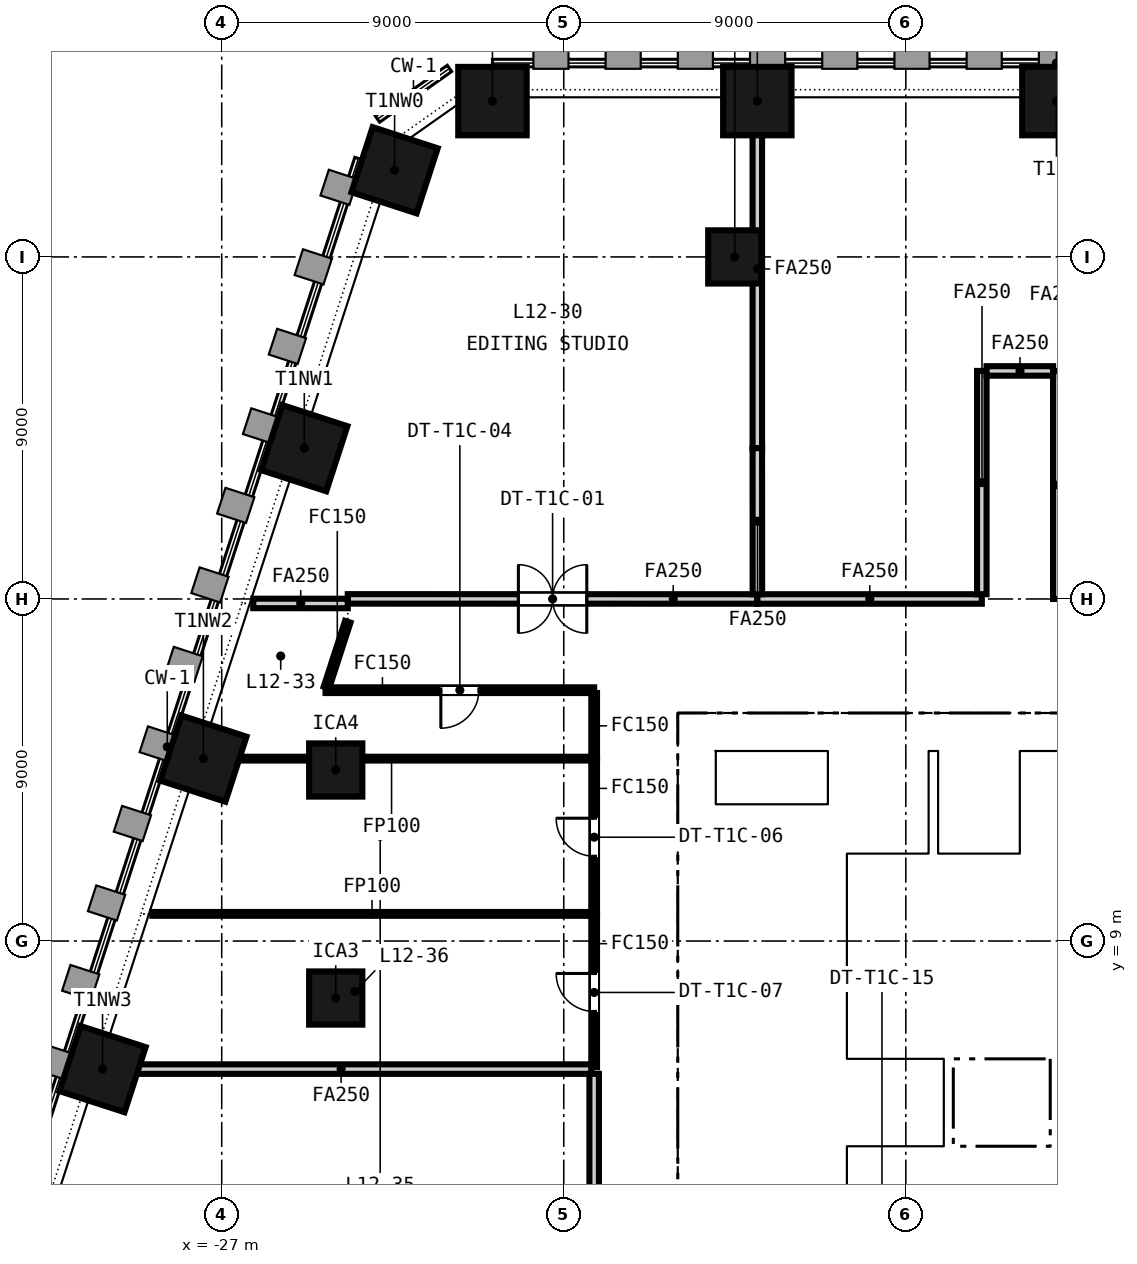
"""IFC4 building model, lengths in metres.
Left out: names, types, materials, properties, quantities, classifications, styles, units other than length and angle.
Written with IfcOpenShell. Run it as: python <this file> out.ifc"""

import sys

from ifc_helpers import new_model, si_unit, direction, frame, frame_2d, origin, origin_2d, place, context, subcontext, project, spatial, rectangle, extrude, element, fill, save


model = new_model("IFC4")
c1 = context("Model", 3, precision=1e-05, world=origin(), true_north=direction((0.0, 1.0)))
c2 = subcontext(c1, "Body", "Model", "MODEL_VIEW")
j1 = project(units=[si_unit("LENGTHUNIT", "METRE"), si_unit("PLANEANGLEUNIT", "RADIAN")], contexts=[c1])
p1 = place(None, origin())
s1 = spatial("IfcSite", under=j1, at=p1, CompositionType="ELEMENT")
p2 = place(p1, origin())
s2 = spatial("IfcBuilding", under=s1, at=p2, CompositionType="ELEMENT")
p3 = place(p2, frame((0.0, 0.0, 57.9)))
s3 = spatial("IfcBuildingStorey", under=s2, at=p3, CompositionType="ELEMENT", Elevation=57.9)
p4 = place(p3, frame((-15.0, 14.5, -0.15), z_axis=(0.0, 0.0, 1.0), x_axis=(1.0, 0.0, 0.0)))
e1 = element("IfcWall", 1, at=p4, inside=s3, PredefinedType="SOLIDWALL", context=c2, shape_type="SweptSolid", body=[
    extrude(rectangle(XDim=30.0, YDim=1.0, at=frame_2d((15.0, 0.0))), origin(), (0.0, 0.0, 1.0), 3.65),
])
p5 = place(p4, frame((9.25, 0.0, 0.15)))
e2 = element("IfcOpeningElement", 2, at=p5, cuts=e1, PredefinedType="OPENING", context=c2, shape_type="SweptSolid", body=[
    extrude(rectangle(XDim=1.5, YDim=2.1, at=frame_2d((0.75, 1.05))), frame((0.0, 0.51, 0.0), z_axis=(0.0, -1.0, 0.0), x_axis=(1.0, 0.0, 0.0)), (0.0, 0.0, 1.0), 1.02),
])
p6 = place(p4, frame((19.4, 0.0, 0.15)))
e3 = element("IfcOpeningElement", 3, at=p6, cuts=e1, PredefinedType="OPENING", context=c2, shape_type="SweptSolid", body=[
    extrude(rectangle(XDim=1.5, YDim=2.1, at=frame_2d((0.75, 1.05))), frame((0.0, 0.51, 0.0), z_axis=(0.0, -1.0, 0.0), x_axis=(1.0, 0.0, 0.0)), (0.0, 0.0, 1.0), 1.02),
])
p7 = place(p4, frame((1.5, 0.0, 0.15)))
e4 = element("IfcOpeningElement", 4, at=p7, cuts=e1, PredefinedType="OPENING", context=c2, shape_type="SweptSolid", body=[
    extrude(rectangle(XDim=1.2, YDim=2.1, at=frame_2d((0.6, 1.05))), frame((0.0, 0.51, 0.0), z_axis=(0.0, -1.0, 0.0), x_axis=(1.0, 0.0, 0.0)), (0.0, 0.0, 1.0), 1.02),
])
p8 = place(p4, frame((27.3, 0.0, 0.15)))
e5 = element("IfcOpeningElement", 5, at=p8, cuts=e1, PredefinedType="OPENING", context=c2, shape_type="SweptSolid", body=[
    extrude(rectangle(XDim=1.2, YDim=2.1, at=frame_2d((0.6, 1.05))), frame((0.0, 0.51, 0.0), z_axis=(0.0, -1.0, 0.0), x_axis=(1.0, 0.0, 0.0)), (0.0, 0.0, 1.0), 1.02),
])
p9 = place(p3, frame((-14.5, 1.0, -0.15), z_axis=(0.0, 0.0, 1.0), x_axis=(0.0, 1.0, 0.0)))
e6 = element("IfcWall", 6, at=p9, inside=s3, PredefinedType="SOLIDWALL", context=c2, shape_type="SweptSolid", body=[
    extrude(rectangle(XDim=13.0, YDim=1.0, at=frame_2d((6.5, 0.0))), origin(), (0.0, 0.0, 1.0), 3.65),
])
p10 = place(p3, frame((-10.8, 1.0, -0.15), z_axis=(0.0, 0.0, 1.0), x_axis=(0.0, 1.0, 0.0)))
e7 = element("IfcWall", 7, at=p10, inside=s3, PredefinedType="SOLIDWALL", context=c2, shape_type="SweptSolid", body=[
    extrude(rectangle(XDim=13.0, YDim=0.5, at=frame_2d((6.5, 0.0))), origin(), (0.0, 0.0, 1.0), 3.65),
])
for number, where, z_axis, x_axis in (
    (8, (-5.037, 31.1, -0.15), (0.0, 0.0, 1.0), (-1.0, 0.0, 0.0)),
    (9, (-12.907, 31.1, -0.15), (0.0, 0.0, 1.0), (-1.0, 0.0, 0.0)),
    (10, (-19.876, 31.1, -0.15), (0.0, 0.0, 1.0), (-1.0, 0.0, 0.0)),
    (11, (-22.451, 29.281, -0.15), (0.0, 0.0, 1.0), (-0.309, -0.951, 0.0)),
    (12, (-24.827, 21.968, -0.15), (0.0, 0.0, 1.0), (-0.309, -0.951, 0.0)),
    (13, (-27.482, 13.799, -0.15), (0.0, 0.0, 1.0), (-0.309, -0.951, 0.0)),
    (14, (-30.136, 5.63, -0.15), (0.0, 0.0, 1.0), (-0.309, -0.951, 0.0)),
):
    element("IfcColumn", number, at=place(p3, frame(where, z_axis=z_axis, x_axis=x_axis)), inside=s3, PredefinedType="COLUMN", context=c2, shape_type="SweptSolid", body=[
        extrude(rectangle(XDim=1.8, YDim=1.8, at=origin_2d()), origin(), (0.0, 0.0, 1.0), 3.65),
    ])
for number, where, z_axis, x_axis in (
    (15, (-24.0, 7.5, -0.15), (0.0, 0.0, 1.0), (1.0, 0.0, 0.0)),
    (16, (-24.0, 13.5, -0.15), (0.0, 0.0, 1.0), (1.0, 0.0, 0.0)),
    (17, (-13.5, 27.0, -0.15), (0.0, 0.0, 1.0), (1.0, 0.0, 0.0)),
):
    element("IfcColumn", number, at=place(p3, frame(where, z_axis=z_axis, x_axis=x_axis)), inside=s3, PredefinedType="COLUMN", context=c2, shape_type="SweptSolid", body=[
        extrude(rectangle(XDim=1.4, YDim=1.4, at=origin_2d()), origin(), (0.0, 0.0, 1.0), 3.65),
    ])
p11 = place(p3, frame((-10.55, 3.5, 0.0), z_axis=(0.0, 0.0, 1.0), x_axis=(1.0, 0.0, 0.0)))
e18 = element("IfcWall", 18, at=p11, inside=s3, PredefinedType="PARTITIONING", context=c2, shape_type="SweptSolid", body=[
    extrude(rectangle(XDim=21.1, YDim=0.2, at=frame_2d((10.55, 0.0))), origin(), (0.0, 0.0, 1.0), 3.5),
])
p12 = place(p11, frame((0.675, 0.0, 0.0)))
e19 = element("IfcOpeningElement", 19, at=p12, cuts=e18, PredefinedType="OPENING", context=c2, shape_type="SweptSolid", body=[
    extrude(rectangle(XDim=1.2, YDim=2.1, at=frame_2d((0.6, 1.05))), frame((0.0, 0.11, 0.0), z_axis=(0.0, -1.0, 0.0), x_axis=(1.0, 0.0, 0.0)), (0.0, 0.0, 1.0), 0.22),
])
p13 = place(p11, frame((3.475, 0.0, 0.0)))
e20 = element("IfcOpeningElement", 20, at=p13, cuts=e18, PredefinedType="OPENING", context=c2, shape_type="SweptSolid", body=[
    extrude(rectangle(XDim=1.2, YDim=2.1, at=frame_2d((0.6, 1.05))), frame((0.0, 0.11, 0.0), z_axis=(0.0, -1.0, 0.0), x_axis=(1.0, 0.0, 0.0)), (0.0, 0.0, 1.0), 0.22),
])
p14 = place(p11, frame((6.275, 0.0, 0.0)))
e21 = element("IfcOpeningElement", 21, at=p14, cuts=e18, PredefinedType="OPENING", context=c2, shape_type="SweptSolid", body=[
    extrude(rectangle(XDim=1.2, YDim=2.1, at=frame_2d((0.6, 1.05))), frame((0.0, 0.11, 0.0), z_axis=(0.0, -1.0, 0.0), x_axis=(1.0, 0.0, 0.0)), (0.0, 0.0, 1.0), 0.22),
])
p15 = place(p11, frame((9.075, 0.0, 0.0)))
e22 = element("IfcOpeningElement", 22, at=p15, cuts=e18, PredefinedType="OPENING", context=c2, shape_type="SweptSolid", body=[
    extrude(rectangle(XDim=1.2, YDim=2.1, at=frame_2d((0.6, 1.05))), frame((0.0, 0.11, 0.0), z_axis=(0.0, -1.0, 0.0), x_axis=(1.0, 0.0, 0.0)), (0.0, 0.0, 1.0), 0.22),
])
p16 = place(p11, frame((11.875, 0.0, 0.0)))
e23 = element("IfcOpeningElement", 23, at=p16, cuts=e18, PredefinedType="OPENING", context=c2, shape_type="SweptSolid", body=[
    extrude(rectangle(XDim=1.2, YDim=2.1, at=frame_2d((0.6, 1.05))), frame((0.0, 0.11, 0.0), z_axis=(0.0, -1.0, 0.0), x_axis=(1.0, 0.0, 0.0)), (0.0, 0.0, 1.0), 0.22),
])
p17 = place(p11, frame((14.675, 0.0, 0.0)))
e24 = element("IfcOpeningElement", 24, at=p17, cuts=e18, PredefinedType="OPENING", context=c2, shape_type="SweptSolid", body=[
    extrude(rectangle(XDim=1.2, YDim=2.1, at=frame_2d((0.6, 1.05))), frame((0.0, 0.11, 0.0), z_axis=(0.0, -1.0, 0.0), x_axis=(1.0, 0.0, 0.0)), (0.0, 0.0, 1.0), 0.22),
])
p18 = place(p11, frame((17.475, 0.0, 0.0)))
e25 = element("IfcOpeningElement", 25, at=p18, cuts=e18, PredefinedType="OPENING", context=c2, shape_type="SweptSolid", body=[
    extrude(rectangle(XDim=1.2, YDim=2.1, at=frame_2d((0.6, 1.05))), frame((0.0, 0.11, 0.0), z_axis=(0.0, -1.0, 0.0), x_axis=(1.0, 0.0, 0.0)), (0.0, 0.0, 1.0), 0.22),
])
p19 = place(p11, frame((19.9, 0.0, 0.0)))
e26 = element("IfcOpeningElement", 26, at=p19, cuts=e18, PredefinedType="OPENING", context=c2, shape_type="SweptSolid", body=[
    extrude(rectangle(XDim=0.9, YDim=2.1, at=frame_2d((0.45, 1.05))), frame((0.0, 0.11, 0.0), z_axis=(0.0, -1.0, 0.0), x_axis=(1.0, 0.0, 0.0)), (0.0, 0.0, 1.0), 0.22),
])
p20 = place(p3, frame((-10.55, 6.025, 0.0), z_axis=(0.0, 0.0, 1.0), x_axis=(1.0, 0.0, 0.0)))
e27 = element("IfcWall", 27, at=p20, inside=s3, PredefinedType="PARTITIONING", context=c2, shape_type="SweptSolid", body=[
    extrude(rectangle(XDim=21.1, YDim=0.25, at=frame_2d((10.55, 0.0))), origin(), (0.0, 0.0, 1.0), 3.5),
])
p21 = place(p3, frame((-10.55, 11.2, 0.0), z_axis=(0.0, 0.0, 1.0), x_axis=(1.0, 0.0, 0.0)))
e28 = element("IfcWall", 28, at=p21, inside=s3, PredefinedType="PARTITIONING", context=c2, shape_type="SweptSolid", body=[
    extrude(rectangle(XDim=4.8, YDim=0.2, at=frame_2d((2.4, 0.0))), origin(), (0.0, 0.0, 1.0), 3.5),
])
p22 = place(p21, frame((0.525, 0.0, 0.0)))
e29 = element("IfcOpeningElement", 29, at=p22, cuts=e28, PredefinedType="OPENING", context=c2, shape_type="SweptSolid", body=[
    extrude(rectangle(XDim=1.1, YDim=2.1, at=frame_2d((0.55, 1.05))), frame((0.0, 0.11, 0.0), z_axis=(0.0, -1.0, 0.0), x_axis=(1.0, 0.0, 0.0)), (0.0, 0.0, 1.0), 0.22),
])
p23 = place(p21, frame((2.925, 0.0, 0.0)))
e30 = element("IfcOpeningElement", 30, at=p23, cuts=e28, PredefinedType="OPENING", context=c2, shape_type="SweptSolid", body=[
    extrude(rectangle(XDim=1.1, YDim=2.1, at=frame_2d((0.55, 1.05))), frame((0.0, 0.11, 0.0), z_axis=(0.0, -1.0, 0.0), x_axis=(1.0, 0.0, 0.0)), (0.0, 0.0, 1.0), 0.22),
])
for number, where, z_axis, x_axis in (
    (31, (-7.875, 3.6, 0.0), (0.0, 0.0, 1.0), (0.0, 1.0, 0.0)),
    (32, (-5.075, 3.6, 0.0), (0.0, 0.0, 1.0), (0.0, 1.0, 0.0)),
):
    element("IfcWall", number, at=place(p3, frame(where, z_axis=z_axis, x_axis=x_axis)), inside=s3, PredefinedType="PARTITIONING", context=c2, shape_type="SweptSolid", body=[
        extrude(rectangle(XDim=2.3, YDim=0.25, at=frame_2d((1.15, 0.0))), origin(), (0.0, 0.0, 1.0), 3.5),
    ])
for number, where, z_axis, x_axis in (
    (33, (-8.275, 11.3, 0.0), (0.0, 0.0, 1.0), (0.0, 1.0, 0.0)),
    (34, (-5.875, 11.3, 0.0), (0.0, 0.0, 1.0), (0.0, 1.0, 0.0)),
):
    element("IfcWall", number, at=place(p3, frame(where, z_axis=z_axis, x_axis=x_axis)), inside=s3, PredefinedType="PARTITIONING", context=c2, shape_type="SweptSolid", body=[
        extrude(rectangle(XDim=2.7, YDim=0.25, at=frame_2d((1.35, 0.0))), origin(), (0.0, 0.0, 1.0), 3.5),
    ])
p24 = place(p3, frame((-14.0, 7.35, -0.15), z_axis=(0.0, 0.0, 1.0), x_axis=(1.0, 0.0, 0.0)))
e35 = element("IfcWall", 35, at=p24, inside=s3, PredefinedType="SOLIDWALL", context=c2, shape_type="SweptSolid", body=[
    extrude(rectangle(XDim=2.95, YDim=0.3, at=frame_2d((1.475, 0.0))), origin(), (0.0, 0.0, 1.0), 3.65),
])
p25 = place(p3, frame((-5.0, 24.0, 0.0), z_axis=(0.0, 0.0, 1.0), x_axis=(0.0, -1.0, 0.0)))
e36 = element("IfcWall", 36, at=p25, inside=s3, PredefinedType="PARTITIONING", context=c2, shape_type="SweptSolid", body=[
    extrude(rectangle(XDim=6.0, YDim=0.25, at=frame_2d((3.0, 0.0))), origin(), (0.0, 0.0, 1.0), 2.741),
])
p26 = place(p3, frame((-17.2, 15.6, 0.0), z_axis=(0.0, 0.0, 1.0), x_axis=(-1.0, 0.0, 0.0)))
e37 = element("IfcWall", 37, at=p26, inside=s3, PredefinedType="PARTITIONING", context=c2, shape_type="SweptSolid", body=[
    extrude(rectangle(XDim=7.068, YDim=0.15, at=frame_2d((3.534, 0.0))), origin(), (0.0, 0.0, 1.0), 2.741),
])
p27 = place(p26, frame((3.034, 0.0, 0.0)))
e38 = element("IfcOpeningElement", 38, at=p27, cuts=e37, PredefinedType="OPENING", context=c2, shape_type="SweptSolid", body=[
    extrude(rectangle(XDim=1.0, YDim=2.1, at=frame_2d((0.5, 1.05))), frame((0.0, 0.085, 0.0), z_axis=(0.0, -1.0, 0.0), x_axis=(1.0, 0.0, 0.0)), (0.0, 0.0, 1.0), 0.17),
])
p28 = place(p3, frame((-23.683, 18.002, 0.0), z_axis=(0.0, 0.0, 1.0), x_axis=(0.999999983581, -0.000181212763, 0.0)))
e39 = element("IfcWall", 39, at=p28, inside=s3, PredefinedType="PARTITIONING", context=c2, shape_type="SweptSolid", body=[
    extrude(rectangle(XDim=10.778, YDim=0.25, at=frame_2d((5.389, 0.0))), origin(), (0.0, 0.0, 1.0), 2.741),
])
p29 = place(p28, frame((4.489, 0.0, 0.0)))
e40 = element("IfcOpeningElement", 40, at=p29, cuts=e39, PredefinedType="OPENING", context=c2, shape_type="SweptSolid", body=[
    extrude(rectangle(XDim=1.8, YDim=2.1, at=frame_2d((0.9, 1.05))), frame((0.0, 0.135, 0.0), z_axis=(0.0, -1.0, 0.0), x_axis=(1.0, 0.0, 0.0)), (0.0, 0.0, 1.0), 0.27),
])
p30 = place(p3, frame((-12.907, 21.968, 0.0), z_axis=(0.0, 0.0, 1.0), x_axis=(0.0, 1.0, 0.0)))
e41 = element("IfcWall", 41, at=p30, inside=s3, PredefinedType="PARTITIONING", context=c2, shape_type="SweptSolid", body=[
    extrude(rectangle(XDim=9.432, YDim=0.25, at=frame_2d((4.716, 0.0))), origin(), (0.0, 0.0, 1.0), 2.741),
])
p31 = place(p3, frame((-26.17, 17.883, 0.0), z_axis=(0.0, 0.0, 1.0), x_axis=(0.999999763866, -0.000687217588, 0.0)))
e42 = element("IfcWall", 42, at=p31, inside=s3, PredefinedType="PARTITIONING", context=c2, shape_type="SweptSolid", body=[
    extrude(rectangle(XDim=2.487, YDim=0.25, at=frame_2d((1.243, 0.0))), origin(), (0.0, 0.0, 1.0), 2.741),
])
p32 = place(p3, frame((-12.905, 18.0, 0.0), z_axis=(0.0, 0.0, 1.0), x_axis=(1.0, 0.0, 0.0)))
e43 = element("IfcWall", 43, at=p32, inside=s3, PredefinedType="PARTITIONING", context=c2, shape_type="SweptSolid", body=[
    extrude(rectangle(XDim=5.905, YDim=0.25, at=frame_2d((2.953, 0.0))), origin(), (0.0, 0.0, 1.0), 2.741),
])
p33 = place(p3, frame((-7.0, 18.125, 0.0), z_axis=(0.0, 0.0, 1.0), x_axis=(0.0, 1.0, 0.0)))
e44 = element("IfcWall", 44, at=p33, inside=s3, PredefinedType="PARTITIONING", context=c2, shape_type="SweptSolid", body=[
    extrude(rectangle(XDim=5.875, YDim=0.25, at=frame_2d((2.938, 0.0))), origin(), (0.0, 0.0, 1.0), 2.741),
])
p34 = place(p3, frame((-6.875, 24.0, 0.0), z_axis=(0.0, 0.0, 1.0), x_axis=(1.0, 0.0, 0.0)))
e45 = element("IfcWall", 45, at=p34, inside=s3, PredefinedType="PARTITIONING", context=c2, shape_type="SweptSolid", body=[
    extrude(rectangle(XDim=1.75, YDim=0.25, at=frame_2d((0.875, 0.0))), origin(), (0.0, 0.0, 1.0), 2.741),
])
p35 = place(p3, frame((-12.907, 21.968, 0.0), z_axis=(0.0, 0.0, 1.0), x_axis=(0.000508226858, -0.999999870853, 0.0)))
e46 = element("IfcWall", 46, at=p35, inside=s3, PredefinedType="PARTITIONING", context=c2, shape_type="SweptSolid", body=[
    extrude(rectangle(XDim=3.843, YDim=0.25, at=frame_2d((1.921, 0.0))), origin(), (0.0, 0.0, 1.0), 2.741),
])
p36 = place(p3, frame((-24.245, 15.671, 0.0), z_axis=(0.0, 0.0, 1.0), x_axis=(0.309086072338, 0.951034068731, 0.0)))
e47 = element("IfcWall", 47, at=p36, inside=s3, PredefinedType="PARTITIONING", context=c2, shape_type="SweptSolid", body=[
    extrude(rectangle(XDim=1.818, YDim=0.15, at=frame_2d((0.909, 0.0))), origin(), (0.0, 0.0, 1.0), 2.741),
])
p37 = place(p3, frame((-17.2, 13.799, 0.0), z_axis=(0.0, 0.0, 1.0), x_axis=(0.0, 1.0, 0.0)))
e48 = element("IfcWall", 48, at=p37, inside=s3, PredefinedType="PARTITIONING", context=c2, shape_type="SweptSolid", body=[
    extrude(rectangle(XDim=1.726, YDim=0.15, at=frame_2d((0.863, 0.0))), origin(), (0.0, 0.0, 1.0), 2.741),
])
p38 = place(p3, frame((-27.797, 13.799, 0.0), z_axis=(0.0, 0.0, 1.0), x_axis=(1.0, 0.0, 0.0)))
e49 = element("IfcWall", 49, at=p38, inside=s3, PredefinedType="PARTITIONING", context=c2, shape_type="SweptSolid", body=[
    extrude(rectangle(XDim=10.522, YDim=0.1, at=frame_2d((5.261, 0.0))), origin(), (0.0, 0.0, 1.0), 2.741),
])
p39 = place(p3, frame((-17.2, 9.714, 0.0), z_axis=(0.0, 0.0, 1.0), x_axis=(0.0, 1.0, 0.0)))
e50 = element("IfcWall", 50, at=p39, inside=s3, PredefinedType="PARTITIONING", context=c2, shape_type="SweptSolid", body=[
    extrude(rectangle(XDim=4.035, YDim=0.15, at=frame_2d((2.018, 0.0))), origin(), (0.0, 0.0, 1.0), 2.741),
])
p40 = place(p39, frame((1.518, 0.0, 0.0)))
e51 = element("IfcOpeningElement", 51, at=p40, cuts=e50, PredefinedType="OPENING", context=c2, shape_type="SweptSolid", body=[
    extrude(rectangle(XDim=1.0, YDim=2.1, at=frame_2d((0.5, 1.05))), frame((0.0, 0.085, 0.0), z_axis=(0.0, -1.0, 0.0), x_axis=(1.0, 0.0, 0.0)), (0.0, 0.0, 1.0), 0.17),
])
p41 = place(p3, frame((-28.824, 9.714, 0.0), z_axis=(0.0, 0.0, 1.0), x_axis=(1.0, 0.0, 0.0)))
e52 = element("IfcWall", 52, at=p41, inside=s3, PredefinedType="PARTITIONING", context=c2, shape_type="SweptSolid", body=[
    extrude(rectangle(XDim=11.549, YDim=0.1, at=frame_2d((5.774, 0.0))), origin(), (0.0, 0.0, 1.0), 2.741),
])
p42 = place(p3, frame((-17.2, 5.68, 0.0), z_axis=(0.0, 0.0, 1.0), x_axis=(0.0, 1.0, 0.0)))
e53 = element("IfcWall", 53, at=p42, inside=s3, PredefinedType="PARTITIONING", context=c2, shape_type="SweptSolid", body=[
    extrude(rectangle(XDim=3.984, YDim=0.15, at=frame_2d((1.992, 0.0))), origin(), (0.0, 0.0, 1.0), 2.741),
])
p43 = place(p42, frame((1.467, 0.0, 0.0)))
e54 = element("IfcOpeningElement", 54, at=p43, cuts=e53, PredefinedType="OPENING", context=c2, shape_type="SweptSolid", body=[
    extrude(rectangle(XDim=1.0, YDim=2.1, at=frame_2d((0.5, 1.05))), frame((0.0, 0.085, 0.0), z_axis=(0.0, -1.0, 0.0), x_axis=(1.0, 0.0, 0.0)), (0.0, 0.0, 1.0), 0.17),
])
p44 = place(p3, frame((-30.451, 5.63, 0.0), z_axis=(0.0, 0.0, 1.0), x_axis=(1.0, 0.0, 0.0)))
e55 = element("IfcWall", 55, at=p44, inside=s3, PredefinedType="PARTITIONING", context=c2, shape_type="SweptSolid", body=[
    extrude(rectangle(XDim=13.176, YDim=0.25, at=frame_2d((6.588, 0.0))), origin(), (0.0, 0.0, 1.0), 2.741),
])
p45 = place(p3, frame((-17.2, -1.475, 0.0), z_axis=(0.0, 0.0, 1.0), x_axis=(0.0, 1.0, 0.0)))
e56 = element("IfcWall", 56, at=p45, inside=s3, PredefinedType="PARTITIONING", context=c2, shape_type="SweptSolid", body=[
    extrude(rectangle(XDim=6.98, YDim=0.25, at=frame_2d((3.49, 0.0))), origin(), (0.0, 0.0, 1.0), 2.741),
])
p46 = place(p12, origin())
e57 = element("IfcDoor", 57, at=p46, inside=s3, OperationType="DOUBLE_DOOR_SLIDING", PredefinedType="DOOR", context=c2, shape_type="SweptSolid", body=[
    extrude(rectangle(XDim=1.2, YDim=2.1, at=frame_2d((0.6, 1.05))), frame((0.0, 0.025, 0.0), z_axis=(0.0, -1.0, 0.0), x_axis=(1.0, 0.0, 0.0)), (0.0, 0.0, 1.0), 0.05),
])
fill(e19, e57)
p47 = place(p13, origin())
e58 = element("IfcDoor", 58, at=p47, inside=s3, OperationType="DOUBLE_DOOR_SLIDING", PredefinedType="DOOR", context=c2, shape_type="SweptSolid", body=[
    extrude(rectangle(XDim=1.2, YDim=2.1, at=frame_2d((0.6, 1.05))), frame((0.0, 0.025, 0.0), z_axis=(0.0, -1.0, 0.0), x_axis=(1.0, 0.0, 0.0)), (0.0, 0.0, 1.0), 0.05),
])
fill(e20, e58)
p48 = place(p22, origin())
e59 = element("IfcDoor", 59, at=p48, inside=s3, OperationType="DOUBLE_DOOR_SLIDING", PredefinedType="DOOR", context=c2, shape_type="SweptSolid", body=[
    extrude(rectangle(XDim=1.1, YDim=2.1, at=frame_2d((0.55, 1.05))), frame((0.0, 0.025, 0.0), z_axis=(0.0, -1.0, 0.0), x_axis=(1.0, 0.0, 0.0)), (0.0, 0.0, 1.0), 0.05),
])
fill(e29, e59)
p49 = place(p23, origin())
e60 = element("IfcDoor", 60, at=p49, inside=s3, OperationType="DOUBLE_DOOR_SLIDING", PredefinedType="DOOR", context=c2, shape_type="SweptSolid", body=[
    extrude(rectangle(XDim=1.1, YDim=2.1, at=frame_2d((0.55, 1.05))), frame((0.0, 0.025, 0.0), z_axis=(0.0, -1.0, 0.0), x_axis=(1.0, 0.0, 0.0)), (0.0, 0.0, 1.0), 0.05),
])
fill(e30, e60)
p50 = place(p5, origin())
e61 = element("IfcDoor", 61, at=p50, inside=s3, OperationType="DOUBLE_DOOR_SINGLE_SWING", PredefinedType="DOOR", context=c2, shape_type="SweptSolid", body=[
    extrude(rectangle(XDim=1.5, YDim=2.1, at=frame_2d((0.75, 1.05))), frame((0.0, 0.025, 0.0), z_axis=(0.0, -1.0, 0.0), x_axis=(1.0, 0.0, 0.0)), (0.0, 0.0, 1.0), 0.05),
])
fill(e2, e61)
p51 = place(p7, origin())
e62 = element("IfcDoor", 62, at=p51, inside=s3, OperationType="SINGLE_SWING_RIGHT", PredefinedType="DOOR", context=c2, shape_type="SweptSolid", body=[
    extrude(rectangle(XDim=1.2, YDim=2.1, at=frame_2d((0.6, 1.05))), frame((0.0, 0.025, 0.0), z_axis=(0.0, -1.0, 0.0), x_axis=(1.0, 0.0, 0.0)), (0.0, 0.0, 1.0), 0.05),
])
fill(e4, e62)
p52 = place(p29, origin())
e63 = element("IfcDoor", 63, at=p52, inside=s3, OperationType="DOUBLE_DOOR_DOUBLE_SWING", PredefinedType="DOOR", context=c2, shape_type="SweptSolid", body=[
    extrude(rectangle(XDim=1.8, YDim=2.1, at=frame_2d((0.9, 1.05))), frame((0.0, 0.025, 0.0), z_axis=(0.0, -1.0, 0.0), x_axis=(1.0, 0.0, 0.0)), (0.0, 0.0, 1.0), 0.05),
])
fill(e40, e63)
p53 = place(p27, origin())
e64 = element("IfcDoor", 64, at=p53, inside=s3, OperationType="SINGLE_SWING_RIGHT", PredefinedType="DOOR", context=c2, shape_type="SweptSolid", body=[
    extrude(rectangle(XDim=1.0, YDim=2.1, at=frame_2d((0.5, 1.05))), frame((0.0, 0.025, 0.0), z_axis=(0.0, -1.0, 0.0), x_axis=(1.0, 0.0, 0.0)), (0.0, 0.0, 1.0), 0.05),
])
fill(e38, e64)
p54 = place(p40, origin())
e65 = element("IfcDoor", 65, at=p54, inside=s3, OperationType="SINGLE_SWING_RIGHT", PredefinedType="DOOR", context=c2, shape_type="SweptSolid", body=[
    extrude(rectangle(XDim=1.0, YDim=2.1, at=frame_2d((0.5, 1.05))), frame((0.0, 0.025, 0.0), z_axis=(0.0, -1.0, 0.0), x_axis=(1.0, 0.0, 0.0)), (0.0, 0.0, 1.0), 0.05),
])
fill(e51, e65)
p55 = place(p43, origin())
e66 = element("IfcDoor", 66, at=p55, inside=s3, OperationType="SINGLE_SWING_RIGHT", PredefinedType="DOOR", context=c2, shape_type="SweptSolid", body=[
    extrude(rectangle(XDim=1.0, YDim=2.1, at=frame_2d((0.5, 1.05))), frame((0.0, 0.025, 0.0), z_axis=(0.0, -1.0, 0.0), x_axis=(1.0, 0.0, 0.0)), (0.0, 0.0, 1.0), 0.05),
])
fill(e54, e66)
save(model, sys.argv[1])
